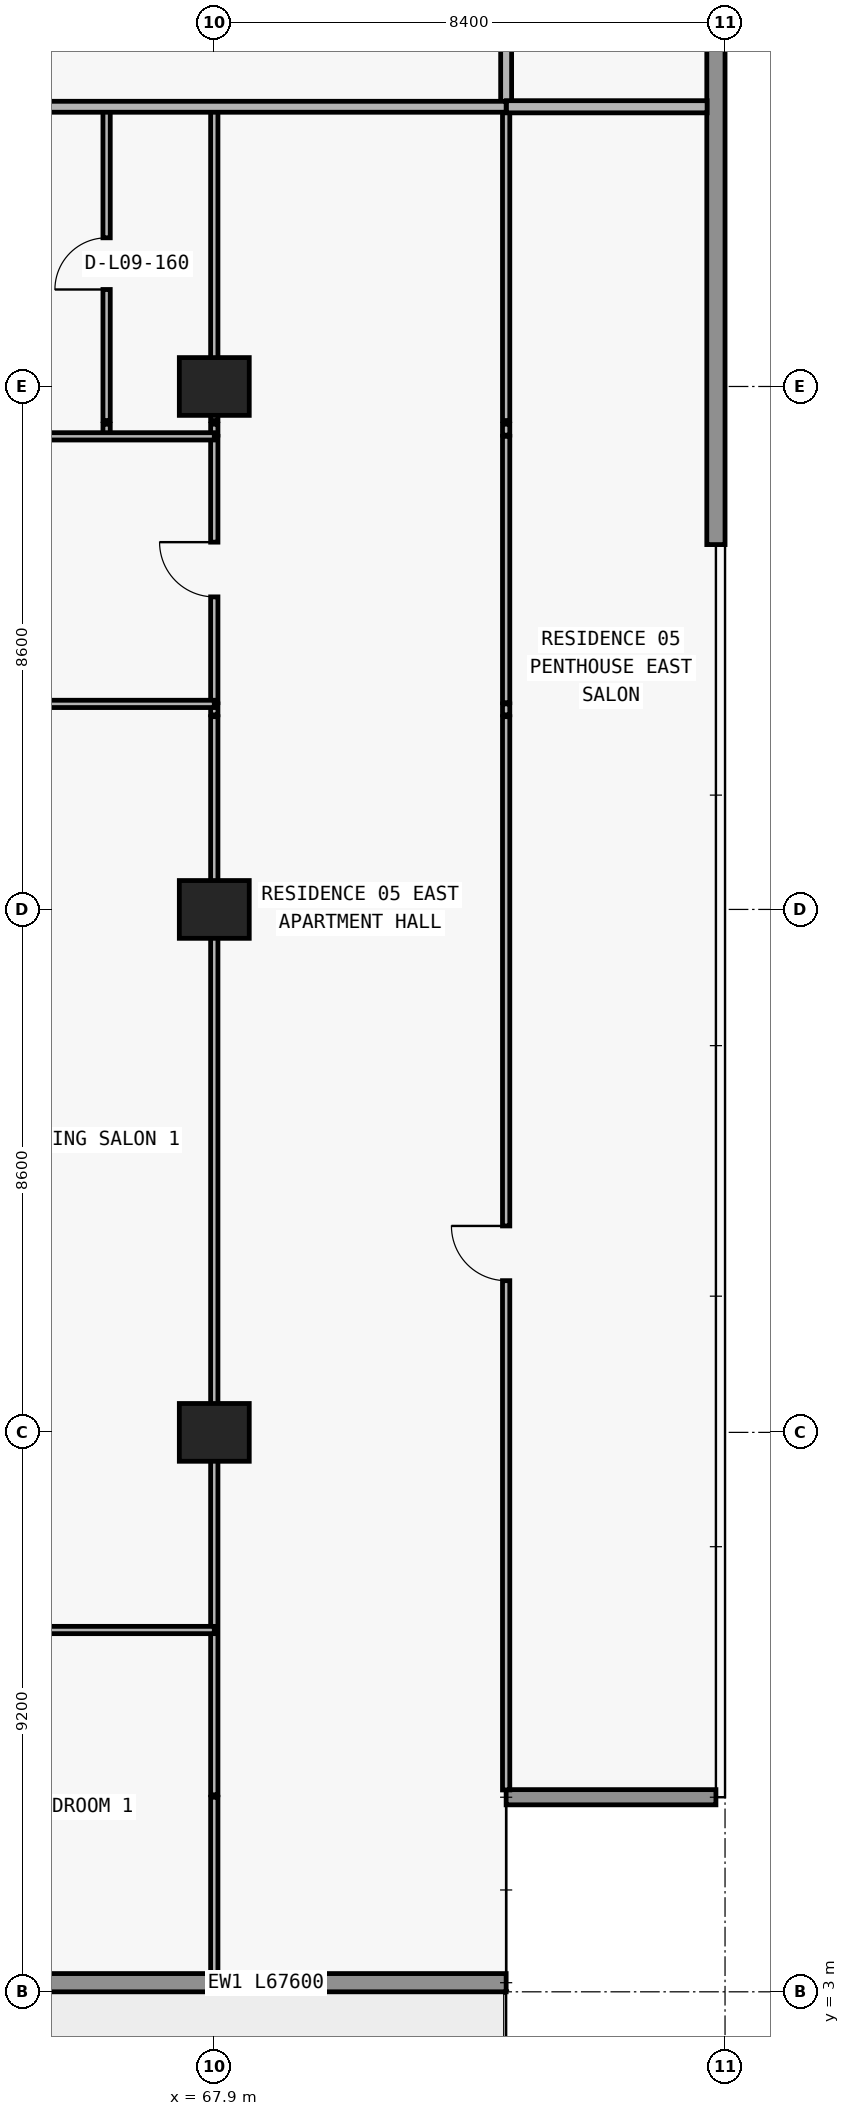
"""IFC4 building model, lengths in metres.
Left out: names, types, materials, properties, quantities, classifications, styles, units other than length and angle.
Written with IfcOpenShell. Run it as: python <this file> out.ifc"""

import sys

from ifc_helpers import new_model, si_unit, direction, frame, frame_2d, origin, origin_2d, place, context, subcontext, project, spatial, rectangle, extrude, element, fill, save


model = new_model("IFC4")
c1 = context("Model", 3, precision=1e-05, world=origin(), true_north=direction((0.0, 1.0)))
c2 = subcontext(c1, "Body", "Model", "MODEL_VIEW")
j1 = project(units=[si_unit("LENGTHUNIT", "METRE"), si_unit("PLANEANGLEUNIT", "RADIAN")], contexts=[c1])
p1 = place(None, origin())
s1 = spatial("IfcSite", under=j1, at=p1, CompositionType="ELEMENT")
p2 = place(p1, origin())
s2 = spatial("IfcBuilding", under=s1, at=p2, CompositionType="ELEMENT")
p3 = place(p2, frame((0.0, 0.0, 39.9)))
s3 = spatial("IfcBuildingStorey", under=s2, at=p3, CompositionType="ELEMENT", Elevation=39.9)
for number, where, z_axis, x_axis in (
    (1, (67.9, 12.2, 0.0), (0.0, 0.0, 1.0), (1.0, 0.0, 0.0)),
    (2, (67.9, 20.8, 0.0), (0.0, 0.0, 1.0), (1.0, 0.0, 0.0)),
    (3, (67.9, 29.4, 0.0), (0.0, 0.0, 1.0), (1.0, 0.0, 0.0)),
):
    element("IfcColumn", number, at=place(p3, frame(where, z_axis=z_axis, x_axis=x_axis)), inside=s3, PredefinedType="COLUMN", context=c2, shape_type="SweptSolid", body=[
        extrude(rectangle(XDim=1.15, YDim=0.95, at=origin_2d()), origin(), (0.0, 0.0, 1.0), 3.05),
    ])
p4 = place(p3, frame((72.7, 3.15, 0.0), z_axis=(0.0, 0.0, 1.0), x_axis=(-1.0, 0.0, 0.0)))
e4 = element("IfcWall", 4, at=p4, inside=s3, PredefinedType="STANDARD", context=c2, shape_type="SweptSolid", body=[
    extrude(rectangle(XDim=67.6, YDim=0.3, at=frame_2d((33.8, 0.0))), origin(), (0.0, 0.0, 1.0), 3.05),
])
p5 = place(p4, frame((59.89, 0.0, 0.0)))
e5 = element("IfcOpeningElement", 5, at=p5, cuts=e4, PredefinedType="OPENING", context=c2, shape_type="SweptSolid", body=[
    extrude(rectangle(XDim=2.0, YDim=2.3, at=frame_2d((1.0, 1.15))), frame((0.0, 0.16, 0.0), z_axis=(0.0, -1.0, 0.0), x_axis=(1.0, 0.0, 0.0)), (0.0, 0.0, 1.0), 0.32),
])
p6 = place(p4, frame((55.21, 0.0, 0.65)))
e6 = element("IfcOpeningElement", 6, at=p6, cuts=e4, PredefinedType="OPENING", context=c2, shape_type="SweptSolid", body=[
    extrude(rectangle(XDim=2.6, YDim=1.85, at=frame_2d((1.3, 0.925))), frame((0.0, 0.16, 0.0), z_axis=(0.0, -1.0, 0.0), x_axis=(1.0, 0.0, 0.0)), (0.0, 0.0, 1.0), 0.32),
])
p7 = place(p4, frame((49.1, 0.0, 0.85)))
e7 = element("IfcOpeningElement", 7, at=p7, cuts=e4, PredefinedType="OPENING", context=c2, shape_type="SweptSolid", body=[
    extrude(rectangle(XDim=2.2, YDim=1.55, at=frame_2d((1.1, 0.775))), frame((0.0, 0.16, 0.0), z_axis=(0.0, -1.0, 0.0), x_axis=(1.0, 0.0, 0.0)), (0.0, 0.0, 1.0), 0.32),
])
p8 = place(p4, frame((42.69, 0.0, 0.0)))
e8 = element("IfcOpeningElement", 8, at=p8, cuts=e4, PredefinedType="OPENING", context=c2, shape_type="SweptSolid", body=[
    extrude(rectangle(XDim=2.0, YDim=2.3, at=frame_2d((1.0, 1.15))), frame((0.0, 0.16, 0.0), z_axis=(0.0, -1.0, 0.0), x_axis=(1.0, 0.0, 0.0)), (0.0, 0.0, 1.0), 0.32),
])
p9 = place(p4, frame((38.59, 0.0, 0.85)))
e9 = element("IfcOpeningElement", 9, at=p9, cuts=e4, PredefinedType="OPENING", context=c2, shape_type="SweptSolid", body=[
    extrude(rectangle(XDim=1.8, YDim=1.55, at=frame_2d((0.9, 0.775))), frame((0.0, 0.16, 0.0), z_axis=(0.0, -1.0, 0.0), x_axis=(1.0, 0.0, 0.0)), (0.0, 0.0, 1.0), 0.32),
])
p10 = place(p4, frame((30.914, 0.0, 0.85)))
e10 = element("IfcOpeningElement", 10, at=p10, cuts=e4, PredefinedType="OPENING", context=c2, shape_type="SweptSolid", body=[
    extrude(rectangle(XDim=2.2, YDim=1.55, at=frame_2d((1.1, 0.775))), frame((0.0, 0.16, 0.0), z_axis=(0.0, -1.0, 0.0), x_axis=(1.0, 0.0, 0.0)), (0.0, 0.0, 1.0), 0.32),
])
p11 = place(p4, frame((26.69, 0.0, 0.0)))
e11 = element("IfcOpeningElement", 11, at=p11, cuts=e4, PredefinedType="OPENING", context=c2, shape_type="SweptSolid", body=[
    extrude(rectangle(XDim=2.0, YDim=2.3, at=frame_2d((1.0, 1.15))), frame((0.0, 0.16, 0.0), z_axis=(0.0, -1.0, 0.0), x_axis=(1.0, 0.0, 0.0)), (0.0, 0.0, 1.0), 0.32),
])
p12 = place(p4, frame((22.59, 0.0, 0.85)))
e12 = element("IfcOpeningElement", 12, at=p12, cuts=e4, PredefinedType="OPENING", context=c2, shape_type="SweptSolid", body=[
    extrude(rectangle(XDim=1.8, YDim=1.55, at=frame_2d((0.9, 0.775))), frame((0.0, 0.16, 0.0), z_axis=(0.0, -1.0, 0.0), x_axis=(1.0, 0.0, 0.0)), (0.0, 0.0, 1.0), 0.32),
])
p13 = place(p4, frame((18.69, 0.0, 0.0)))
e13 = element("IfcOpeningElement", 13, at=p13, cuts=e4, PredefinedType="OPENING", context=c2, shape_type="SweptSolid", body=[
    extrude(rectangle(XDim=2.0, YDim=2.3, at=frame_2d((1.0, 1.15))), frame((0.0, 0.16, 0.0), z_axis=(0.0, -1.0, 0.0), x_axis=(1.0, 0.0, 0.0)), (0.0, 0.0, 1.0), 0.32),
])
p14 = place(p4, frame((14.01, 0.0, 0.65)))
e14 = element("IfcOpeningElement", 14, at=p14, cuts=e4, PredefinedType="OPENING", context=c2, shape_type="SweptSolid", body=[
    extrude(rectangle(XDim=2.6, YDim=1.85, at=frame_2d((1.3, 0.925))), frame((0.0, 0.16, 0.0), z_axis=(0.0, -1.0, 0.0), x_axis=(1.0, 0.0, 0.0)), (0.0, 0.0, 1.0), 0.32),
])
p15 = place(p4, frame((7.9, 0.0, 0.85)))
e15 = element("IfcOpeningElement", 15, at=p15, cuts=e4, PredefinedType="OPENING", context=c2, shape_type="SweptSolid", body=[
    extrude(rectangle(XDim=2.2, YDim=1.55, at=frame_2d((1.1, 0.775))), frame((0.0, 0.16, 0.0), z_axis=(0.0, -1.0, 0.0), x_axis=(1.0, 0.0, 0.0)), (0.0, 0.0, 1.0), 0.32),
])
p16 = place(p3, frame((72.7, 6.2, 0.0), z_axis=(0.0, 0.0, 1.0), x_axis=(1.0, 0.0, 0.0)))
e16 = element("IfcWall", 16, at=p16, inside=s3, PredefinedType="ELEMENTEDWALL", context=c2, shape_type="SweptSolid", body=[
    extrude(rectangle(XDim=3.45, YDim=0.25, at=frame_2d((1.725, 0.0))), origin(), (0.0, 0.0, 1.0), 3.05),
])
p17 = place(p3, frame((76.15, 47.4, 0.0), z_axis=(0.0, 0.0, 1.0), x_axis=(0.0, -1.0, 0.0)))
e17 = element("IfcWall", 17, at=p17, inside=s3, PredefinedType="STANDARD", context=c2, shape_type="SweptSolid", body=[
    extrude(rectangle(XDim=20.6, YDim=0.3, at=frame_2d((10.3, 0.0))), origin(), (0.0, 0.0, 1.0), 3.05),
])
p18 = place(p3, frame((66.129, 28.6, 0.0), z_axis=(0.0, 0.0, 1.0), x_axis=(0.0, 1.0, 0.0)))
e18 = element("IfcWall", 18, at=p18, inside=s3, PredefinedType="PARTITIONING", context=c2, shape_type="SweptSolid", body=[
    extrude(rectangle(XDim=0.18, YDim=0.12, at=frame_2d((0.09, 0.0))), origin(), (0.0, 0.0, 1.0), 3.05),
])
p19 = place(p3, frame((66.129, 28.84, 0.0), z_axis=(0.0, 0.0, 1.0), x_axis=(0.0, 1.0, 0.0)))
e19 = element("IfcWall", 19, at=p19, inside=s3, PredefinedType="PARTITIONING", context=c2, shape_type="SweptSolid", body=[
    extrude(rectangle(XDim=5.16, YDim=0.12, at=frame_2d((2.58, 0.0))), origin(), (0.0, 0.0, 1.0), 3.05),
])
p20 = place(p19, frame((2.155, 0.0, 0.0)))
e20 = element("IfcOpeningElement", 20, at=p20, cuts=e19, PredefinedType="OPENING", context=c2, shape_type="SweptSolid", body=[
    extrude(rectangle(XDim=0.85, YDim=2.1, at=frame_2d((0.425, 1.05))), frame((0.0, 0.07, 0.0), z_axis=(0.0, -1.0, 0.0), x_axis=(1.0, 0.0, 0.0)), (0.0, 0.0, 1.0), 0.14),
])
p21 = place(p3, frame((67.9, 3.295, 0.0), z_axis=(0.0, 0.0, 1.0), x_axis=(0.0, 1.0, 0.0)))
e21 = element("IfcWall", 21, at=p21, inside=s3, PredefinedType="PARTITIONING", context=c2, shape_type="SweptSolid", body=[
    extrude(rectangle(XDim=2.905, YDim=0.12, at=frame_2d((1.453, 0.0))), origin(), (0.0, 0.0, 1.0), 3.05),
])
p22 = place(p3, frame((67.9, 6.24, 0.0), z_axis=(0.0, 0.0, 1.0), x_axis=(0.0, 1.0, 0.0)))
e22 = element("IfcWall", 22, at=p22, inside=s3, PredefinedType="PARTITIONING", context=c2, shape_type="SweptSolid", body=[
    extrude(rectangle(XDim=17.73, YDim=0.12, at=frame_2d((8.865, 0.0))), origin(), (0.0, 0.0, 1.0), 2.11),
])
p23 = place(p3, frame((67.9, 24.0, 0.0), z_axis=(0.0, 0.0, 1.0), x_axis=(0.0, 1.0, 0.0)))
e23 = element("IfcWall", 23, at=p23, inside=s3, PredefinedType="PARTITIONING", context=c2, shape_type="SweptSolid", body=[
    extrude(rectangle(XDim=0.18, YDim=0.12, at=frame_2d((0.09, 0.0))), origin(), (0.0, 0.0, 1.0), 2.11),
])
p24 = place(p3, frame((67.9, 24.2, 0.0), z_axis=(0.0, 0.0, 1.0), x_axis=(0.0, 1.0, 0.0)))
e24 = element("IfcWall", 24, at=p24, inside=s3, PredefinedType="PARTITIONING", context=c2, shape_type="SweptSolid", body=[
    extrude(rectangle(XDim=4.38, YDim=0.12, at=frame_2d((2.19, 0.0))), origin(), (0.0, 0.0, 1.0), 2.11),
])
p25 = place(p24, frame((1.74, 0.0, 0.0)))
e25 = element("IfcOpeningElement", 25, at=p25, cuts=e24, PredefinedType="OPENING", context=c2, shape_type="SweptSolid", body=[
    extrude(rectangle(XDim=0.9, YDim=2.06, at=frame_2d((0.45, 1.03))), frame((0.0, 0.07, 0.0), z_axis=(0.0, -1.0, 0.0), x_axis=(1.0, 0.0, 0.0)), (0.0, 0.0, 1.0), 0.14),
])
p26 = place(p3, frame((67.9, 28.6, 0.0), z_axis=(0.0, 0.0, 1.0), x_axis=(0.0, 1.0, 0.0)))
e26 = element("IfcWall", 26, at=p26, inside=s3, PredefinedType="PARTITIONING", context=c2, shape_type="SweptSolid", body=[
    extrude(rectangle(XDim=0.18, YDim=0.12, at=frame_2d((0.09, 0.0))), origin(), (0.0, 0.0, 1.0), 2.11),
])
p27 = place(p3, frame((67.9, 28.84, 0.0), z_axis=(0.0, 0.0, 1.0), x_axis=(0.0, 1.0, 0.0)))
e27 = element("IfcWall", 27, at=p27, inside=s3, PredefinedType="PARTITIONING", context=c2, shape_type="SweptSolid", body=[
    extrude(rectangle(XDim=5.16, YDim=0.12, at=frame_2d((2.58, 0.0))), origin(), (0.0, 0.0, 1.0), 2.11),
])
p28 = place(p3, frame((72.7, 6.32, 0.0), z_axis=(0.0, 0.0, 1.0), x_axis=(0.0, 1.0, 0.0)))
e28 = element("IfcWall", 28, at=p28, inside=s3, PredefinedType="PARTITIONING", context=c2, shape_type="SweptSolid", body=[
    extrude(rectangle(XDim=17.65, YDim=0.12, at=frame_2d((8.825, 0.0))), origin(), (0.0, 0.0, 1.0), 3.05),
])
p29 = place(p28, frame((8.375, 0.0, 0.0)))
e29 = element("IfcOpeningElement", 29, at=p29, cuts=e28, PredefinedType="OPENING", context=c2, shape_type="SweptSolid", body=[
    extrude(rectangle(XDim=0.9, YDim=2.15, at=frame_2d((0.45, 1.075))), frame((0.0, 0.07, 0.0), z_axis=(0.0, -1.0, 0.0), x_axis=(1.0, 0.0, 0.0)), (0.0, 0.0, 1.0), 0.14),
])
p30 = place(p3, frame((72.7, 24.0, 0.0), z_axis=(0.0, 0.0, 1.0), x_axis=(0.0, 1.0, 0.0)))
e30 = element("IfcWall", 30, at=p30, inside=s3, PredefinedType="PARTITIONING", context=c2, shape_type="SweptSolid", body=[
    extrude(rectangle(XDim=0.18, YDim=0.12, at=frame_2d((0.09, 0.0))), origin(), (0.0, 0.0, 1.0), 3.05),
])
p31 = place(p3, frame((72.7, 24.2, 0.0), z_axis=(0.0, 0.0, 1.0), x_axis=(0.0, 1.0, 0.0)))
e31 = element("IfcWall", 31, at=p31, inside=s3, PredefinedType="PARTITIONING", context=c2, shape_type="SweptSolid", body=[
    extrude(rectangle(XDim=4.38, YDim=0.12, at=frame_2d((2.19, 0.0))), origin(), (0.0, 0.0, 1.0), 3.05),
])
p32 = place(p3, frame((72.7, 28.6, 0.0), z_axis=(0.0, 0.0, 1.0), x_axis=(0.0, 1.0, 0.0)))
e32 = element("IfcWall", 32, at=p32, inside=s3, PredefinedType="PARTITIONING", context=c2, shape_type="SweptSolid", body=[
    extrude(rectangle(XDim=0.18, YDim=0.12, at=frame_2d((0.09, 0.0))), origin(), (0.0, 0.0, 1.0), 3.05),
])
p33 = place(p3, frame((72.7, 28.84, 0.0), z_axis=(0.0, 0.0, 1.0), x_axis=(0.0, 1.0, 0.0)))
e33 = element("IfcWall", 33, at=p33, inside=s3, PredefinedType="PARTITIONING", context=c2, shape_type="SweptSolid", body=[
    extrude(rectangle(XDim=5.16, YDim=0.12, at=frame_2d((2.58, 0.0))), origin(), (0.0, 0.0, 1.0), 3.05),
])
p34 = place(p3, frame((72.7, 34.005, 0.0), z_axis=(0.0, 0.0, 1.0), x_axis=(0.0, 1.0, 0.0)))
e34 = element("IfcWall", 34, at=p34, inside=s3, PredefinedType="PARTITIONING", context=c2, shape_type="SweptSolid", body=[
    extrude(rectangle(XDim=2.895, YDim=0.18, at=frame_2d((1.448, 0.0))), origin(), (0.0, 0.0, 1.0), 3.05),
])
p35 = place(p3, frame((59.5, 8.95, 0.0), z_axis=(0.0, 0.0, 1.0), x_axis=(1.0, 0.0, 0.0)))
e35 = element("IfcWall", 35, at=p35, inside=s3, PredefinedType="PARTITIONING", context=c2, shape_type="SweptSolid", body=[
    extrude(rectangle(XDim=8.4, YDim=0.12, at=frame_2d((4.2, 0.0))), origin(), (0.0, 0.0, 1.0), 3.05),
])
p36 = place(p35, frame((3.75, 0.0, 0.0)))
e36 = element("IfcOpeningElement", 36, at=p36, cuts=e35, PredefinedType="OPENING", context=c2, shape_type="SweptSolid", body=[
    extrude(rectangle(XDim=0.9, YDim=2.15, at=frame_2d((0.45, 1.075))), frame((0.0, 0.07, 0.0), z_axis=(0.0, -1.0, 0.0), x_axis=(1.0, 0.0, 0.0)), (0.0, 0.0, 1.0), 0.14),
])
p37 = place(p3, frame((59.505, 24.18, 0.0), z_axis=(0.0, 0.0, 1.0), x_axis=(1.0, 0.0, 0.0)))
e37 = element("IfcWall", 37, at=p37, inside=s3, PredefinedType="PARTITIONING", context=c2, shape_type="SweptSolid", body=[
    extrude(rectangle(XDim=8.395, YDim=0.12, at=frame_2d((4.198, 0.0))), origin(), (0.0, 0.0, 1.0), 3.05),
])
p38 = place(p37, frame((3.748, 0.0, 0.0)))
e38 = element("IfcOpeningElement", 38, at=p38, cuts=e37, PredefinedType="OPENING", context=c2, shape_type="SweptSolid", body=[
    extrude(rectangle(XDim=0.9, YDim=2.15, at=frame_2d((0.45, 1.075))), frame((0.0, 0.07, 0.0), z_axis=(0.0, -1.0, 0.0), x_axis=(1.0, 0.0, 0.0)), (0.0, 0.0, 1.0), 0.14),
])
p39 = place(p3, frame((59.5, 28.58, 0.0), z_axis=(0.0, 0.0, 1.0), x_axis=(1.0, 0.0, 0.0)))
e39 = element("IfcWall", 39, at=p39, inside=s3, PredefinedType="PARTITIONING", context=c2, shape_type="SweptSolid", body=[
    extrude(rectangle(XDim=8.4, YDim=0.12, at=frame_2d((4.2, 0.0))), origin(), (0.0, 0.0, 1.0), 3.05),
])
p40 = place(p39, frame((2.865, 0.0, 0.0)))
e40 = element("IfcOpeningElement", 40, at=p40, cuts=e39, PredefinedType="OPENING", context=c2, shape_type="SweptSolid", body=[
    extrude(rectangle(XDim=0.9, YDim=2.15, at=frame_2d((0.45, 1.075))), frame((0.0, 0.07, 0.0), z_axis=(0.0, -1.0, 0.0), x_axis=(1.0, 0.0, 0.0)), (0.0, 0.0, 1.0), 0.14),
])
p41 = place(p3, frame((5.105, 34.0, 0.0), z_axis=(0.0, 0.0, 1.0), x_axis=(1.0, 0.0, 0.0)))
e41 = element("IfcWall", 41, at=p41, inside=s3, PredefinedType="PARTITIONING", context=c2, shape_type="SweptSolid", body=[
    extrude(rectangle(XDim=67.595, YDim=0.18, at=frame_2d((33.797, 0.0))), origin(), (0.0, 0.0, 1.0), 3.05),
])
p42 = place(p41, frame((7.504, 0.0, 0.0)))
e42 = element("IfcOpeningElement", 42, at=p42, cuts=e41, PredefinedType="OPENING", context=c2, shape_type="SweptSolid", body=[
    extrude(rectangle(XDim=1.0, YDim=2.2, at=frame_2d((0.5, 1.1))), frame((0.0, 0.1, 0.0), z_axis=(0.0, -1.0, 0.0), x_axis=(1.0, 0.0, 0.0)), (0.0, 0.0, 1.0), 0.2),
])
p43 = place(p41, frame((24.213, 0.0, 0.0)))
e43 = element("IfcOpeningElement", 43, at=p43, cuts=e41, PredefinedType="OPENING", context=c2, shape_type="SweptSolid", body=[
    extrude(rectangle(XDim=1.0, YDim=2.2, at=frame_2d((0.5, 1.1))), frame((0.0, 0.1, 0.0), z_axis=(0.0, -1.0, 0.0), x_axis=(1.0, 0.0, 0.0)), (0.0, 0.0, 1.0), 0.2),
])
p44 = place(p41, frame((32.365, 0.0, 0.0)))
e44 = element("IfcOpeningElement", 44, at=p44, cuts=e41, PredefinedType="OPENING", context=c2, shape_type="SweptSolid", body=[
    extrude(rectangle(XDim=1.0, YDim=2.2, at=frame_2d((0.5, 1.1))), frame((0.0, 0.1, 0.0), z_axis=(0.0, -1.0, 0.0), x_axis=(1.0, 0.0, 0.0)), (0.0, 0.0, 1.0), 0.2),
])
p45 = place(p41, frame((40.24, 0.0, 0.0)))
e45 = element("IfcOpeningElement", 45, at=p45, cuts=e41, PredefinedType="OPENING", context=c2, shape_type="SweptSolid", body=[
    extrude(rectangle(XDim=1.0, YDim=2.2, at=frame_2d((0.5, 1.1))), frame((0.0, 0.1, 0.0), z_axis=(0.0, -1.0, 0.0), x_axis=(1.0, 0.0, 0.0)), (0.0, 0.0, 1.0), 0.2),
])
p46 = place(p41, frame((48.708, 0.0, 0.0)))
e46 = element("IfcOpeningElement", 46, at=p46, cuts=e41, PredefinedType="OPENING", context=c2, shape_type="SweptSolid", body=[
    extrude(rectangle(XDim=1.0, YDim=2.2, at=frame_2d((0.5, 1.1))), frame((0.0, 0.1, 0.0), z_axis=(0.0, -1.0, 0.0), x_axis=(1.0, 0.0, 0.0)), (0.0, 0.0, 1.0), 0.2),
])
p47 = place(p3, frame((72.705, 34.0, 0.0), z_axis=(0.0, 0.0, 1.0), x_axis=(1.0, 0.0, 0.0)))
e47 = element("IfcWall", 47, at=p47, inside=s3, PredefinedType="PARTITIONING", context=c2, shape_type="SweptSolid", body=[
    extrude(rectangle(XDim=3.3, YDim=0.2, at=frame_2d((1.65, 0.0))), origin(), (0.0, 0.0, 1.0), 3.05),
])
p48 = place(p20, origin())
e48 = element("IfcDoor", 48, at=p48, inside=s3, OperationType="SINGLE_SWING_LEFT", PredefinedType="DOOR", context=c2, shape_type="SweptSolid", body=[
    extrude(rectangle(XDim=0.85, YDim=2.1, at=frame_2d((0.425, 1.05))), frame((0.0, 0.025, 0.0), z_axis=(0.0, -1.0, 0.0), x_axis=(1.0, 0.0, 0.0)), (0.0, 0.0, 1.0), 0.05),
])
fill(e20, e48)
p49 = place(p25, origin())
e49 = element("IfcDoor", 49, at=p49, inside=s3, OperationType="SINGLE_SWING_RIGHT", PredefinedType="DOOR", context=c2, shape_type="SweptSolid", body=[
    extrude(rectangle(XDim=0.9, YDim=2.06, at=frame_2d((0.45, 1.03))), frame((0.0, 0.025, 0.0), z_axis=(0.0, -1.0, 0.0), x_axis=(1.0, 0.0, 0.0)), (0.0, 0.0, 1.0), 0.05),
])
fill(e25, e49)
p50 = place(p29, origin())
e50 = element("IfcDoor", 50, at=p50, inside=s3, OperationType="SINGLE_SWING_RIGHT", PredefinedType="DOOR", context=c2, shape_type="SweptSolid", body=[
    extrude(rectangle(XDim=0.9, YDim=2.15, at=frame_2d((0.45, 1.075))), frame((0.0, 0.025, 0.0), z_axis=(0.0, -1.0, 0.0), x_axis=(1.0, 0.0, 0.0)), (0.0, 0.0, 1.0), 0.05),
])
fill(e29, e50)
save(model, sys.argv[1])
